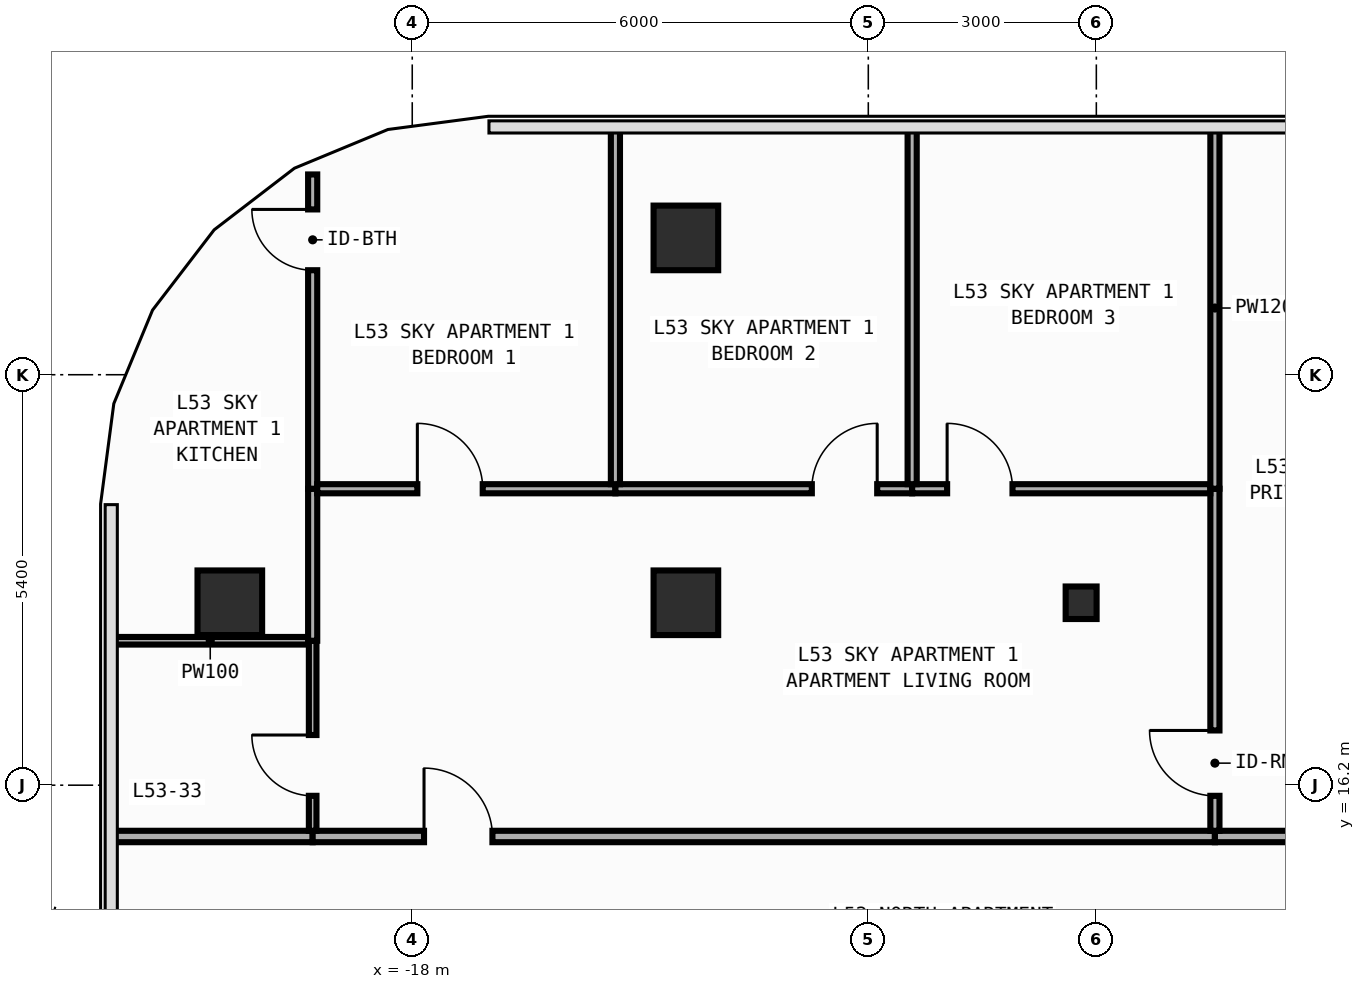
"""IFC4 building model, lengths in metres.
Left out: names, types, materials, properties, quantities, classifications, styles, units other than length and angle.
Written with IfcOpenShell. Run it as: python <this file> out.ifc"""

import sys

from ifc_helpers import new_model, si_unit, direction, frame, frame_2d, origin, origin_2d, place, context, subcontext, project, spatial, rectangle, i_section, extrude, element, fill, save


model = new_model("IFC4")
c1 = context("Model", 3, precision=1e-05, world=origin(), true_north=direction((0.0, 1.0)))
c2 = subcontext(c1, "Body", "Model", "MODEL_VIEW")
j1 = project(units=[si_unit("LENGTHUNIT", "METRE"), si_unit("PLANEANGLEUNIT", "RADIAN")], contexts=[c1])
p1 = place(None, origin())
s1 = spatial("IfcSite", under=j1, at=p1, CompositionType="ELEMENT")
p2 = place(p1, origin())
s2 = spatial("IfcBuilding", under=s1, at=p2, CompositionType="ELEMENT")
p3 = place(p2, frame((0.0, 0.0, 229.6)))
s3 = spatial("IfcBuildingStorey", under=s2, at=p3, CompositionType="ELEMENT", Elevation=229.6)
p4 = place(p3, frame((-9.2, 18.6, 0.0), z_axis=(0.0, 0.0, 1.0), x_axis=(1.0, 0.0, 0.0)))
e1 = element("IfcColumn", 1, at=p4, inside=s3, PredefinedType="COLUMN", context=c2, shape_type="SweptSolid", body=[
    extrude(i_section(OverallWidth=0.407, OverallDepth=0.428, WebThickness=0.02, FlangeThickness=0.035, FilletRadius=0.022, at=origin_2d()), origin(), (0.0, 0.0, 1.0), 3.6),
])
for number, where, z_axis, x_axis in (
    (2, (-20.4, 18.6, 0.0), (0.0, 0.0, 1.0), (1.0, 0.0, 0.0)),
    (3, (-14.4, 18.6, 0.0), (0.0, 0.0, 1.0), (1.0, 0.0, 0.0)),
    (4, (-14.4, 23.4, 0.0), (0.0, 0.0, 1.0), (1.0, 0.0, 0.0)),
):
    element("IfcColumn", number, at=place(p3, frame(where, z_axis=z_axis, x_axis=x_axis)), inside=s3, PredefinedType="COLUMN", context=c2, shape_type="SweptSolid", body=[
        extrude(rectangle(XDim=0.85, YDim=0.85, at=origin_2d()), origin(), (0.0, 0.0, 1.0), 3.6),
    ])
p5 = place(p3, frame((-21.955, 15.525, 0.0), z_axis=(0.0, 0.0, 1.0), x_axis=(1.0, 0.0, 0.0)))
e5 = element("IfcWall", 5, at=p5, inside=s3, PredefinedType="PARTITIONING", context=c2, shape_type="SweptSolid", body=[
    extrude(rectangle(XDim=2.645, YDim=0.15, at=frame_2d((1.323, 0.0))), origin(), (0.0, 0.0, 1.0), 3.34),
])
p6 = place(p3, frame((-19.31, 15.525, 0.0), z_axis=(0.0, 0.0, 1.0), x_axis=(1.0, 0.0, 0.0)))
e6 = element("IfcWall", 6, at=p6, inside=s3, PredefinedType="PARTITIONING", context=c2, shape_type="SweptSolid", body=[
    extrude(rectangle(XDim=11.87, YDim=0.15, at=frame_2d((5.935, 0.0))), origin(), (0.0, 0.0, 1.0), 3.34),
])
p7 = place(p6, frame((1.465, 0.0, 0.0)))
e7 = element("IfcOpeningElement", 7, at=p7, cuts=e6, PredefinedType="OPENING", context=c2, shape_type="SweptSolid", body=[
    extrude(rectangle(XDim=0.9, YDim=2.15, at=frame_2d((0.45, 1.075))), frame((0.0, 0.085, 0.0), z_axis=(0.0, -1.0, 0.0), x_axis=(1.0, 0.0, 0.0)), (0.0, 0.0, 1.0), 0.17),
])
p8 = place(p3, frame((-7.44, 15.525, 0.0), z_axis=(0.0, 0.0, 1.0), x_axis=(1.0, 0.0, 0.0)))
e8 = element("IfcWall", 8, at=p8, inside=s3, PredefinedType="PARTITIONING", context=c2, shape_type="SweptSolid", body=[
    extrude(rectangle(XDim=4.04, YDim=0.15, at=frame_2d((2.02, 0.0))), origin(), (0.0, 0.0, 1.0), 3.34),
])
p9 = place(p3, frame((-21.955, 18.1, 0.0), z_axis=(0.0, 0.0, 1.0), x_axis=(1.0, 0.0, 0.0)))
e9 = element("IfcWall", 9, at=p9, inside=s3, PredefinedType="PARTITIONING", context=c2, shape_type="SweptSolid", body=[
    extrude(rectangle(XDim=2.595, YDim=0.1, at=frame_2d((1.297, 0.0))), origin(), (0.0, 0.0, 1.0), 3.34),
])
p10 = place(p3, frame((-19.31, 15.6, 0.0), z_axis=(0.0, 0.0, 1.0), x_axis=(0.0, 1.0, 0.0)))
e10 = element("IfcWall", 10, at=p10, inside=s3, PredefinedType="PARTITIONING", context=c2, shape_type="SweptSolid", body=[
    extrude(rectangle(XDim=2.5, YDim=0.1, at=frame_2d((1.25, 0.0))), origin(), (0.0, 0.0, 1.0), 3.34),
])
p11 = place(p10, frame((0.46, 0.0, 0.0)))
e11 = element("IfcOpeningElement", 11, at=p11, cuts=e10, PredefinedType="OPENING", context=c2, shape_type="SweptSolid", body=[
    extrude(rectangle(XDim=0.8, YDim=2.1, at=frame_2d((0.4, 1.05))), frame((0.0, 0.06, 0.0), z_axis=(0.0, -1.0, 0.0), x_axis=(1.0, 0.0, 0.0)), (0.0, 0.0, 1.0), 0.12),
])
p12 = place(p3, frame((-19.31, 18.1, 0.0), z_axis=(0.0, 0.0, 1.0), x_axis=(0.0, 1.0, 0.0)))
e12 = element("IfcWall", 12, at=p12, inside=s3, PredefinedType="PARTITIONING", context=c2, shape_type="SweptSolid", body=[
    extrude(rectangle(XDim=2.0, YDim=0.12, at=frame_2d((1.0, 0.0))), origin(), (0.0, 0.0, 1.0), 3.34),
])
p13 = place(p3, frame((-19.31, 20.1, 0.0), z_axis=(0.0, 0.0, 1.0), x_axis=(0.0, 1.0, 0.0)))
e13 = element("IfcWall", 13, at=p13, inside=s3, PredefinedType="PARTITIONING", context=c2, shape_type="SweptSolid", body=[
    extrude(rectangle(XDim=4.135, YDim=0.12, at=frame_2d((2.067, 0.0))), origin(), (0.0, 0.0, 1.0), 3.34),
])
p14 = place(p13, frame((2.875, 0.0, 0.0)))
e14 = element("IfcOpeningElement", 14, at=p14, cuts=e13, PredefinedType="OPENING", context=c2, shape_type="SweptSolid", body=[
    extrude(rectangle(XDim=0.8, YDim=2.1, at=frame_2d((0.4, 1.05))), frame((0.0, 0.07, 0.0), z_axis=(0.0, -1.0, 0.0), x_axis=(1.0, 0.0, 0.0)), (0.0, 0.0, 1.0), 0.14),
])
p15 = place(p3, frame((-7.44, 15.6, 0.0), z_axis=(0.0, 0.0, 1.0), x_axis=(0.0, 1.0, 0.0)))
e15 = element("IfcWall", 15, at=p15, inside=s3, PredefinedType="PARTITIONING", context=c2, shape_type="SweptSolid", body=[
    extrude(rectangle(XDim=4.5, YDim=0.12, at=frame_2d((2.25, 0.0))), origin(), (0.0, 0.0, 1.0), 3.34),
])
p16 = place(p15, frame((0.46, 0.0, 0.0)))
e16 = element("IfcOpeningElement", 16, at=p16, cuts=e15, PredefinedType="OPENING", context=c2, shape_type="SweptSolid", body=[
    extrude(rectangle(XDim=0.86, YDim=2.15, at=frame_2d((0.43, 1.075))), frame((0.0, 0.07, 0.0), z_axis=(0.0, -1.0, 0.0), x_axis=(1.0, 0.0, 0.0)), (0.0, 0.0, 1.0), 0.14),
])
p17 = place(p3, frame((-19.25, 20.1, 0.0), z_axis=(0.0, 0.0, 1.0), x_axis=(1.0, 0.0, 0.0)))
e17 = element("IfcWall", 17, at=p17, inside=s3, PredefinedType="PARTITIONING", context=c2, shape_type="SweptSolid", body=[
    extrude(rectangle(XDim=3.923, YDim=0.12, at=frame_2d((1.961, 0.0))), origin(), (0.0, 0.0, 1.0), 3.34),
])
p18 = place(p17, frame((1.317, 0.0, 0.0)))
e18 = element("IfcOpeningElement", 18, at=p18, cuts=e17, PredefinedType="OPENING", context=c2, shape_type="SweptSolid", body=[
    extrude(rectangle(XDim=0.86, YDim=2.15, at=frame_2d((0.43, 1.075))), frame((0.0, 0.07, 0.0), z_axis=(0.0, -1.0, 0.0), x_axis=(1.0, 0.0, 0.0)), (0.0, 0.0, 1.0), 0.14),
])
p19 = place(p3, frame((-15.327, 20.1, 0.0), z_axis=(0.0, 0.0, 1.0), x_axis=(1.0, 0.0, 0.0)))
e19 = element("IfcWall", 19, at=p19, inside=s3, PredefinedType="PARTITIONING", context=c2, shape_type="SweptSolid", body=[
    extrude(rectangle(XDim=3.904, YDim=0.12, at=frame_2d((1.952, 0.0))), origin(), (0.0, 0.0, 1.0), 3.34),
])
p20 = place(p19, frame((2.584, 0.0, 0.0)))
e20 = element("IfcOpeningElement", 20, at=p20, cuts=e19, PredefinedType="OPENING", context=c2, shape_type="SweptSolid", body=[
    extrude(rectangle(XDim=0.86, YDim=2.15, at=frame_2d((0.43, 1.075))), frame((0.0, 0.07, 0.0), z_axis=(0.0, -1.0, 0.0), x_axis=(1.0, 0.0, 0.0)), (0.0, 0.0, 1.0), 0.14),
])
p21 = place(p3, frame((-11.423, 20.1, 0.0), z_axis=(0.0, 0.0, 1.0), x_axis=(1.0, 0.0, 0.0)))
e21 = element("IfcWall", 21, at=p21, inside=s3, PredefinedType="PARTITIONING", context=c2, shape_type="SweptSolid", body=[
    extrude(rectangle(XDim=3.923, YDim=0.12, at=frame_2d((1.961, 0.0))), origin(), (0.0, 0.0, 1.0), 3.34),
])
p22 = place(p21, frame((0.46, 0.0, 0.0)))
e22 = element("IfcOpeningElement", 22, at=p22, cuts=e21, PredefinedType="OPENING", context=c2, shape_type="SweptSolid", body=[
    extrude(rectangle(XDim=0.86, YDim=2.15, at=frame_2d((0.43, 1.075))), frame((0.0, 0.07, 0.0), z_axis=(0.0, -1.0, 0.0), x_axis=(1.0, 0.0, 0.0)), (0.0, 0.0, 1.0), 0.14),
])
p23 = place(p3, frame((-7.44, 20.1, 0.0), z_axis=(0.0, 0.0, 1.0), x_axis=(0.0, 1.0, 0.0)))
e23 = element("IfcWall", 23, at=p23, inside=s3, PredefinedType="PARTITIONING", context=c2, shape_type="SweptSolid", body=[
    extrude(rectangle(XDim=4.755, YDim=0.12, at=frame_2d((2.377, 0.0))), origin(), (0.0, 0.0, 1.0), 3.34),
])
for number, where, z_axis, x_axis in (
    (24, (-15.327, 20.16, 0.0), (0.0, 0.0, 1.0), (0.0, 1.0, 0.0)),
    (25, (-11.423, 20.16, 0.0), (0.0, 0.0, 1.0), (0.0, 1.0, 0.0)),
):
    element("IfcWall", number, at=place(p3, frame(where, z_axis=z_axis, x_axis=x_axis)), inside=s3, PredefinedType="PARTITIONING", context=c2, shape_type="SweptSolid", body=[
        extrude(rectangle(XDim=4.695, YDim=0.12, at=frame_2d((2.348, 0.0))), origin(), (0.0, 0.0, 1.0), 3.34),
    ])
p24 = place(p7, origin())
e26 = element("IfcDoor", 26, at=p24, inside=s3, OperationType="SINGLE_SWING_LEFT", PredefinedType="DOOR", context=c2, shape_type="SweptSolid", body=[
    extrude(rectangle(XDim=0.9, YDim=2.15, at=frame_2d((0.45, 1.075))), frame((0.0, 0.025, 0.0), z_axis=(0.0, -1.0, 0.0), x_axis=(1.0, 0.0, 0.0)), (0.0, 0.0, 1.0), 0.05),
])
fill(e7, e26)
p25 = place(p11, origin())
e27 = element("IfcDoor", 27, at=p25, inside=s3, OperationType="SINGLE_SWING_RIGHT", PredefinedType="DOOR", context=c2, shape_type="SweptSolid", body=[
    extrude(rectangle(XDim=0.8, YDim=2.1, at=frame_2d((0.4, 1.05))), frame((0.0, 0.025, 0.0), z_axis=(0.0, -1.0, 0.0), x_axis=(1.0, 0.0, 0.0)), (0.0, 0.0, 1.0), 0.05),
])
fill(e11, e27)
p26 = place(p16, origin())
e28 = element("IfcDoor", 28, at=p26, inside=s3, OperationType="SINGLE_SWING_RIGHT", PredefinedType="DOOR", context=c2, shape_type="SweptSolid", body=[
    extrude(rectangle(XDim=0.86, YDim=2.15, at=frame_2d((0.43, 1.075))), frame((0.0, 0.025, 0.0), z_axis=(0.0, -1.0, 0.0), x_axis=(1.0, 0.0, 0.0)), (0.0, 0.0, 1.0), 0.05),
])
fill(e16, e28)
p27 = place(p18, origin())
e29 = element("IfcDoor", 29, at=p27, inside=s3, OperationType="SINGLE_SWING_LEFT", PredefinedType="DOOR", context=c2, shape_type="SweptSolid", body=[
    extrude(rectangle(XDim=0.86, YDim=2.15, at=frame_2d((0.43, 1.075))), frame((0.0, 0.025, 0.0), z_axis=(0.0, -1.0, 0.0), x_axis=(1.0, 0.0, 0.0)), (0.0, 0.0, 1.0), 0.05),
])
fill(e18, e29)
p28 = place(p20, origin())
e30 = element("IfcDoor", 30, at=p28, inside=s3, OperationType="SINGLE_SWING_RIGHT", PredefinedType="DOOR", context=c2, shape_type="SweptSolid", body=[
    extrude(rectangle(XDim=0.86, YDim=2.15, at=frame_2d((0.43, 1.075))), frame((0.0, 0.025, 0.0), z_axis=(0.0, -1.0, 0.0), x_axis=(1.0, 0.0, 0.0)), (0.0, 0.0, 1.0), 0.05),
])
fill(e20, e30)
p29 = place(p22, origin())
e31 = element("IfcDoor", 31, at=p29, inside=s3, OperationType="SINGLE_SWING_LEFT", PredefinedType="DOOR", context=c2, shape_type="SweptSolid", body=[
    extrude(rectangle(XDim=0.86, YDim=2.15, at=frame_2d((0.43, 1.075))), frame((0.0, 0.025, 0.0), z_axis=(0.0, -1.0, 0.0), x_axis=(1.0, 0.0, 0.0)), (0.0, 0.0, 1.0), 0.05),
])
fill(e22, e31)
p30 = place(p14, origin())
e32 = element("IfcDoor", 32, at=p30, inside=s3, OperationType="SINGLE_SWING_RIGHT", PredefinedType="DOOR", context=c2, shape_type="SweptSolid", body=[
    extrude(rectangle(XDim=0.8, YDim=2.1, at=frame_2d((0.4, 1.05))), frame((0.0, 0.025, 0.0), z_axis=(0.0, -1.0, 0.0), x_axis=(1.0, 0.0, 0.0)), (0.0, 0.0, 1.0), 0.05),
])
fill(e14, e32)
save(model, sys.argv[1])
